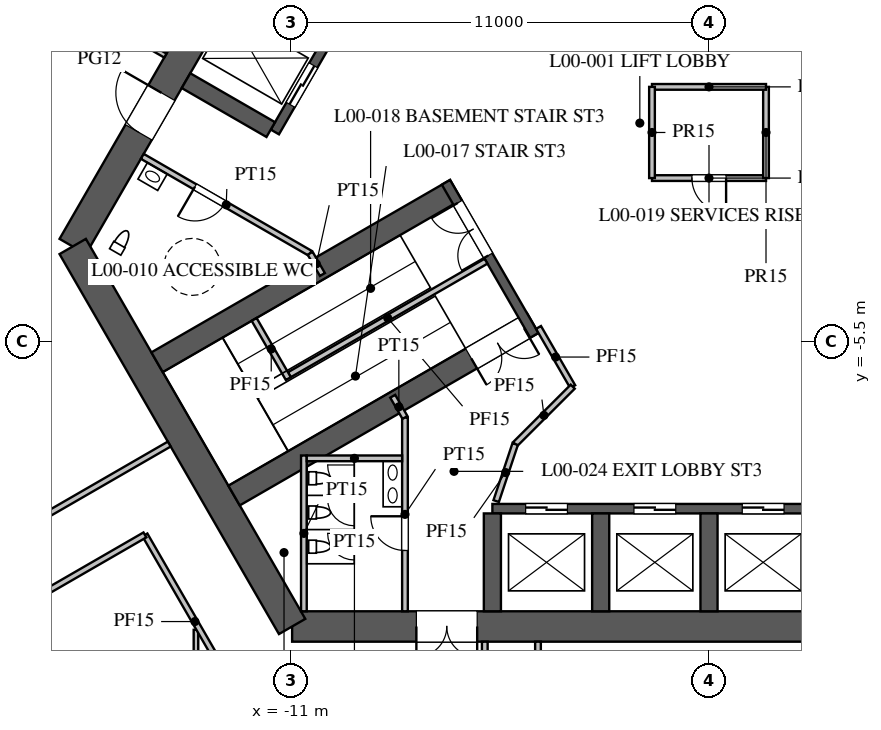
"""IFC4 building model, lengths in metres.
Left out: names, types, materials, properties, quantities, classifications, styles, units other than length and angle.
Written with IfcOpenShell. Run it as: python <this file> out.ifc"""

import sys

from ifc_helpers import new_model, si_unit, direction, frame, frame_2d, origin, place, context, subcontext, project, spatial, polyline, rectangle, outline, extrude, element, fill, save


model = new_model("IFC4")
c1 = context("Model", 3, precision=1e-05, world=origin(), true_north=direction((0.0, 1.0)))
c2 = subcontext(c1, "Body", "Model", "MODEL_VIEW")
j1 = project(units=[si_unit("LENGTHUNIT", "METRE"), si_unit("PLANEANGLEUNIT", "RADIAN")], contexts=[c1])
p1 = place(None, origin())
s1 = spatial("IfcSite", under=j1, at=p1, CompositionType="ELEMENT")
p2 = place(p1, origin())
s2 = spatial("IfcBuilding", under=s1, at=p2, CompositionType="ELEMENT")
p3 = place(p2, origin())
s3 = spatial("IfcBuildingStorey", under=s2, at=p3, CompositionType="ELEMENT", Elevation=0.0)
p4 = place(p3, frame((-10.97, -13.0, 0.0), z_axis=(0.0, 0.0, 1.0), x_axis=(1.0, 0.0, 0.0)))
e1 = element("IfcWall", 1, at=p4, inside=s3, PredefinedType="SHEAR", context=c2, shape_type="SweptSolid", body=[
    extrude(rectangle(XDim=21.939, YDim=0.8, at=frame_2d((10.97, 0.0))), origin(), (0.0, 0.0, 1.0), 6.5),
])
p5 = place(p4, frame((16.97, 0.0, 0.0)))
e2 = element("IfcOpeningElement", 2, at=p5, cuts=e1, PredefinedType="OPENING", context=c2, shape_type="SweptSolid", body=[
    extrude(rectangle(XDim=1.8, YDim=2.1, at=frame_2d((0.9, 1.05))), frame((0.0, 0.41, 0.0), z_axis=(0.0, -1.0, 0.0), x_axis=(1.0, 0.0, 0.0)), (0.0, 0.0, 1.0), 0.82),
])
p6 = place(p4, frame((3.27, 0.0, 0.0)))
e3 = element("IfcOpeningElement", 3, at=p6, cuts=e1, PredefinedType="OPENING", context=c2, shape_type="SweptSolid", body=[
    extrude(rectangle(XDim=1.6, YDim=2.1, at=frame_2d((0.8, 1.05))), frame((0.0, 0.41, 0.0), z_axis=(0.0, -1.0, 0.0), x_axis=(1.0, 0.0, 0.0)), (0.0, 0.0, 1.0), 0.82),
])
p7 = place(p3, frame((-5.773, 16.0, 0.0), z_axis=(0.0, 0.0, 1.0), x_axis=(-0.500002442456, -0.866023993627, 0.0)))
e4 = element("IfcWall", 4, at=p7, inside=s3, PredefinedType="SHEAR", context=c2, shape_type="SweptSolid", body=[
    extrude(rectangle(XDim=21.939, YDim=0.8, at=frame_2d((10.97, 0.0))), origin(), (0.0, 0.0, 1.0), 6.5),
])
p8 = place(p7, frame((17.27, 0.0, 0.0)))
e5 = element("IfcOpeningElement", 5, at=p8, cuts=e4, PredefinedType="OPENING", context=c2, shape_type="SweptSolid", body=[
    extrude(rectangle(XDim=1.2, YDim=2.1, at=frame_2d((0.6, 1.05))), frame((0.0, 0.41, 0.0), z_axis=(0.0, -1.0, 0.0), x_axis=(1.0, 0.0, 0.0)), (0.0, 0.0, 1.0), 0.82),
])
p9 = place(p7, frame((3.27, 0.0, 0.0)))
e6 = element("IfcOpeningElement", 6, at=p9, cuts=e4, PredefinedType="OPENING", context=c2, shape_type="SweptSolid", body=[
    extrude(rectangle(XDim=1.6, YDim=2.1, at=frame_2d((0.8, 1.05))), frame((0.0, 0.41, 0.0), z_axis=(0.0, -1.0, 0.0), x_axis=(1.0, 0.0, 0.0)), (0.0, 0.0, 1.0), 0.82),
])
p10 = place(p3, frame((-16.743, -3.0, 0.0), z_axis=(0.0, 0.0, 1.0), x_axis=(0.499995765644, -0.866027848477, 0.0)))
e7 = element("IfcWall", 7, at=p10, inside=s3, PredefinedType="SHEAR", context=c2, shape_type="SweptSolid", body=[
    extrude(rectangle(XDim=11.547, YDim=0.8, at=frame_2d((5.773, 0.0))), origin(), (0.0, 0.0, 1.0), 6.5),
])
p11 = place(p3, frame((-5.7, -9.9, 0.0), z_axis=(0.0, 0.0, 1.0), x_axis=(1.0, 0.0, 0.0)))
e8 = element("IfcWall", 8, at=p11, inside=s3, PredefinedType="SHEAR", context=c2, shape_type="SweptSolid", body=[
    extrude(rectangle(XDim=11.4, YDim=0.25, at=frame_2d((5.7, 0.0))), origin(), (0.0, 0.0, 1.0), 6.5),
])
p12 = place(p11, frame((0.875, 0.0, 0.0)))
e9 = element("IfcOpeningElement", 9, at=p12, cuts=e8, PredefinedType="OPENING", context=c2, shape_type="SweptSolid", body=[
    extrude(rectangle(XDim=1.1, YDim=2.2, at=frame_2d((0.55, 1.1))), frame((0.0, 0.135, 0.0), z_axis=(0.0, -1.0, 0.0), x_axis=(1.0, 0.0, 0.0)), (0.0, 0.0, 1.0), 0.27),
])
p13 = place(p11, frame((3.725, 0.0, 0.0)))
e10 = element("IfcOpeningElement", 10, at=p13, cuts=e8, PredefinedType="OPENING", context=c2, shape_type="SweptSolid", body=[
    extrude(rectangle(XDim=1.1, YDim=2.2, at=frame_2d((0.55, 1.1))), frame((0.0, 0.135, 0.0), z_axis=(0.0, -1.0, 0.0), x_axis=(1.0, 0.0, 0.0)), (0.0, 0.0, 1.0), 0.27),
])
p14 = place(p11, frame((6.575, 0.0, 0.0)))
e11 = element("IfcOpeningElement", 11, at=p14, cuts=e8, PredefinedType="OPENING", context=c2, shape_type="SweptSolid", body=[
    extrude(rectangle(XDim=1.1, YDim=2.2, at=frame_2d((0.55, 1.1))), frame((0.0, 0.135, 0.0), z_axis=(0.0, -1.0, 0.0), x_axis=(1.0, 0.0, 0.0)), (0.0, 0.0, 1.0), 0.27),
])
p15 = place(p11, frame((9.425, 0.0, 0.0)))
e12 = element("IfcOpeningElement", 12, at=p15, cuts=e8, PredefinedType="OPENING", context=c2, shape_type="SweptSolid", body=[
    extrude(rectangle(XDim=1.1, YDim=2.2, at=frame_2d((0.55, 1.1))), frame((0.0, 0.135, 0.0), z_axis=(0.0, -1.0, 0.0), x_axis=(1.0, 0.0, 0.0)), (0.0, 0.0, 1.0), 0.27),
])
for number, where, z_axis, x_axis in (
    (13, (-5.7, -10.025, 0.0), (0.0, 0.0, 1.0), (0.0, -1.0, 0.0)),
    (14, (-2.85, -10.025, 0.0), (0.0, 0.0, 1.0), (0.0, -1.0, 0.0)),
    (15, (0.0, -10.025, 0.0), (0.0, 0.0, 1.0), (0.0, -1.0, 0.0)),
):
    element("IfcWall", number, at=place(p3, frame(where, z_axis=z_axis, x_axis=x_axis)), inside=s3, PredefinedType="SHEAR", context=c2, shape_type="SweptSolid", body=[
        extrude(rectangle(XDim=2.575, YDim=0.45, at=frame_2d((1.288, 0.0))), origin(), (0.0, 0.0, 1.0), 6.5),
    ])
p16 = place(p3, frame((-5.724, 9.886, 0.0), z_axis=(0.0, 0.0, 1.0), x_axis=(-0.500001763848, -0.866024385424, 0.0)))
e16 = element("IfcWall", 16, at=p16, inside=s3, PredefinedType="SHEAR", context=c2, shape_type="SweptSolid", body=[
    extrude(rectangle(XDim=11.4, YDim=0.25, at=frame_2d((5.7, 0.0))), origin(), (0.0, 0.0, 1.0), 6.5),
])
p17 = place(p16, frame((0.875, 0.0, 0.0)))
e17 = element("IfcOpeningElement", 17, at=p17, cuts=e16, PredefinedType="OPENING", context=c2, shape_type="SweptSolid", body=[
    extrude(rectangle(XDim=1.1, YDim=2.2, at=frame_2d((0.55, 1.1))), frame((0.0, 0.135, 0.0), z_axis=(0.0, -1.0, 0.0), x_axis=(1.0, 0.0, 0.0)), (0.0, 0.0, 1.0), 0.27),
])
p18 = place(p16, frame((3.725, 0.0, 0.0)))
e18 = element("IfcOpeningElement", 18, at=p18, cuts=e16, PredefinedType="OPENING", context=c2, shape_type="SweptSolid", body=[
    extrude(rectangle(XDim=1.1, YDim=2.2, at=frame_2d((0.55, 1.1))), frame((0.0, 0.135, 0.0), z_axis=(0.0, -1.0, 0.0), x_axis=(1.0, 0.0, 0.0)), (0.0, 0.0, 1.0), 0.27),
])
p19 = place(p16, frame((6.525, 0.0, 0.0)))
e19 = element("IfcOpeningElement", 19, at=p19, cuts=e16, PredefinedType="OPENING", context=c2, shape_type="SweptSolid", body=[
    extrude(rectangle(XDim=1.2, YDim=2.2, at=frame_2d((0.6, 1.1))), frame((0.0, 0.135, 0.0), z_axis=(0.0, -1.0, 0.0), x_axis=(1.0, 0.0, 0.0)), (0.0, 0.0, 1.0), 0.27),
])
p20 = place(p16, frame((9.375, 0.0, 0.0)))
e20 = element("IfcOpeningElement", 20, at=p20, cuts=e16, PredefinedType="OPENING", context=c2, shape_type="SweptSolid", body=[
    extrude(rectangle(XDim=1.2, YDim=2.2, at=frame_2d((0.6, 1.1))), frame((0.0, 0.135, 0.0), z_axis=(0.0, -1.0, 0.0), x_axis=(1.0, 0.0, 0.0)), (0.0, 0.0, 1.0), 0.27),
])
p21 = place(p3, frame((-11.532, 0.076, 0.0), z_axis=(0.0, 0.0, 1.0), x_axis=(-0.866005588531, 0.500034319456, 0.0)))
e21 = element("IfcWall", 21, at=p21, inside=s3, PredefinedType="SHEAR", context=c2, shape_type="SweptSolid", body=[
    extrude(rectangle(XDim=2.575, YDim=0.45, at=frame_2d((1.288, 0.0))), origin(), (0.0, 0.0, 1.0), 6.5),
])
p22 = place(p3, frame((-6.663, -1.509, 0.0), z_axis=(0.0, 0.0, 1.0), x_axis=(-0.866019375473, -0.500010441196, 0.0)))
e22 = element("IfcWall", 22, at=p22, inside=s3, PredefinedType="SHEAR", context=c2, shape_type="SweptSolid", body=[
    extrude(rectangle(XDim=9.075, YDim=0.6, at=frame_2d((4.538, 0.0))), origin(), (0.0, 0.0, 1.0), 6.5),
])
p23 = place(p3, frame((-4.638, -5.016, 0.0), z_axis=(0.0, 0.0, 1.0), x_axis=(-0.866019375473, -0.500010441196, 0.0)))
e23 = element("IfcWall", 23, at=p23, inside=s3, PredefinedType="SHEAR", context=c2, shape_type="SweptSolid", body=[
    extrude(rectangle(XDim=9.075, YDim=0.6, at=frame_2d((4.538, 0.0))), origin(), (0.0, 0.0, 1.0), 6.5),
])
p24 = place(p23, frame((0.265, 0.0, 0.0)))
e24 = element("IfcOpeningElement", 24, at=p24, cuts=e23, PredefinedType="OPENING", context=c2, shape_type="SweptSolid", body=[
    extrude(rectangle(XDim=1.6, YDim=2.1, at=frame_2d((0.8, 1.05))), frame((0.0, 0.31, 0.0), z_axis=(0.0, -1.0, 0.0), x_axis=(1.0, 0.0, 0.0)), (0.0, 0.0, 1.0), 0.62),
])
p25 = place(p3, frame((-6.922, -1.312, 0.0), z_axis=(0.0, 0.0, 1.0), x_axis=(0.499984536904, -0.866034331223, 0.0)))
e25 = element("IfcWall", 25, at=p25, inside=s3, PredefinedType="SHEAR", context=c2, shape_type="SweptSolid", body=[
    extrude(rectangle(XDim=4.65, YDim=0.25, at=frame_2d((2.325, 0.0))), origin(), (0.0, 0.0, 1.0), 6.5),
])
p26 = place(p25, frame((0.625, 0.0, 0.0)))
e26 = element("IfcOpeningElement", 26, at=p26, cuts=e25, PredefinedType="OPENING", context=c2, shape_type="SweptSolid", body=[
    extrude(rectangle(XDim=1.6, YDim=2.1, at=frame_2d((0.8, 1.05))), frame((0.0, 0.135, 0.0), z_axis=(0.0, -1.0, 0.0), x_axis=(1.0, 0.0, 0.0)), (0.0, 0.0, 1.0), 0.27),
])
p27 = place(p3, frame((-8.0, -7.5, 0.0), z_axis=(0.0, 0.0, 1.0), x_axis=(0.0, -1.0, 0.0)))
e27 = element("IfcWall", 27, at=p27, inside=s3, PredefinedType="PARTITIONING", context=c2, shape_type="SweptSolid", body=[
    extrude(rectangle(XDim=5.1, YDim=0.15, at=frame_2d((2.55, 0.0))), origin(), (0.0, 0.0, 1.0), 6.3),
])
p28 = place(p27, frame((2.6, 0.0, 0.0)))
e28 = element("IfcOpeningElement", 28, at=p28, cuts=e27, PredefinedType="OPENING", context=c2, shape_type="SweptSolid", body=[
    extrude(rectangle(XDim=0.9, YDim=2.1, at=frame_2d((0.45, 1.05))), frame((0.0, 0.085, 0.0), z_axis=(0.0, -1.0, 0.0), x_axis=(1.0, 0.0, 0.0)), (0.0, 0.0, 1.0), 0.17),
])
p29 = place(p3, frame((-10.495, -3.178, 0.0), z_axis=(0.0, 0.0, 1.0), x_axis=(-0.86602216432, 0.500005610874, 0.0)))
e29 = element("IfcWall", 29, at=p29, inside=s3, PredefinedType="PARTITIONING", context=c2, shape_type="SweptSolid", body=[
    extrude(rectangle(XDim=5.1, YDim=0.15, at=frame_2d((2.55, 0.0))), origin(), (0.0, 0.0, 1.0), 6.3),
])
p30 = place(p29, frame((2.6, 0.0, 0.0)))
e30 = element("IfcOpeningElement", 30, at=p30, cuts=e29, PredefinedType="OPENING", context=c2, shape_type="SweptSolid", body=[
    extrude(rectangle(XDim=0.9, YDim=2.1, at=frame_2d((0.45, 1.05))), frame((0.0, 0.085, 0.0), z_axis=(0.0, -1.0, 0.0), x_axis=(1.0, 0.0, 0.0)), (0.0, 0.0, 1.0), 0.17),
])
for number, where, z_axis, x_axis in (
    (31, (-10.495, -3.178, 0.0), (0.0, 0.0, 1.0), (0.5, -0.866, 0.0)),
    (32, (-8.0, -7.5, 0.0), (0.0, 0.0, 1.0), (-0.5, 0.866, 0.0)),
):
    element("IfcWall", number, at=place(p3, frame(where, z_axis=z_axis, x_axis=x_axis)), inside=s3, PredefinedType="PARTITIONING", context=c2, shape_type="SweptSolid", body=[
        extrude(rectangle(XDim=0.645, YDim=0.15, at=frame_2d((0.323, 0.0))), origin(), (0.0, 0.0, 1.0), 6.3),
    ])
p31 = place(p3, frame((-10.66, -8.5, 0.0), z_axis=(0.0, 0.0, 1.0), x_axis=(0.0, -1.0, 0.0)))
e33 = element("IfcWall", 33, at=p31, inside=s3, PredefinedType="PARTITIONING", context=c2, shape_type="SweptSolid", body=[
    extrude(rectangle(XDim=4.1, YDim=0.15, at=frame_2d((2.05, 0.0))), origin(), (0.0, 0.0, 1.0), 6.3),
])
p32 = place(p3, frame((-8.075, -8.575, 0.0), z_axis=(0.0, 0.0, 1.0), x_axis=(-1.0, 0.0, 0.0)))
e34 = element("IfcWall", 34, at=p32, inside=s3, PredefinedType="PARTITIONING", context=c2, shape_type="SweptSolid", body=[
    extrude(rectangle(XDim=2.51, YDim=0.15, at=frame_2d((1.255, 0.0))), origin(), (0.0, 0.0, 1.0), 6.3),
])
p33 = place(p3, frame((-1.5, -1.2, 0.0), z_axis=(0.0, 0.0, 1.0), x_axis=(1.0, 0.0, 0.0)))
e35 = element("IfcWall", 35, at=p33, inside=s3, PredefinedType="PARTITIONING", context=c2, shape_type="SweptSolid", body=[
    extrude(rectangle(XDim=3.0, YDim=0.15, at=frame_2d((1.5, 0.0))), origin(), (0.0, 0.0, 1.0), 6.3),
])
p34 = place(p33, frame((1.05, 0.0, 0.0)))
e36 = element("IfcOpeningElement", 36, at=p34, cuts=e35, PredefinedType="OPENING", context=c2, shape_type="SweptSolid", body=[
    extrude(rectangle(XDim=0.9, YDim=2.1, at=frame_2d((0.45, 1.05))), frame((0.0, 0.085, 0.0), z_axis=(0.0, -1.0, 0.0), x_axis=(1.0, 0.0, 0.0)), (0.0, 0.0, 1.0), 0.17),
])
p35 = place(p3, frame((1.5, -1.2, 0.0), z_axis=(0.0, 0.0, 1.0), x_axis=(0.0, 1.0, 0.0)))
e37 = element("IfcWall", 37, at=p35, inside=s3, PredefinedType="PARTITIONING", context=c2, shape_type="SweptSolid", body=[
    extrude(rectangle(XDim=2.4, YDim=0.15, at=frame_2d((1.2, 0.0))), origin(), (0.0, 0.0, 1.0), 6.3),
])
p36 = place(p3, frame((1.5, 1.2, 0.0), z_axis=(0.0, 0.0, 1.0), x_axis=(-1.0, 0.0, 0.0)))
e38 = element("IfcWall", 38, at=p36, inside=s3, PredefinedType="PARTITIONING", context=c2, shape_type="SweptSolid", body=[
    extrude(rectangle(XDim=3.0, YDim=0.15, at=frame_2d((1.5, 0.0))), origin(), (0.0, 0.0, 1.0), 6.3),
])
p37 = place(p3, frame((-1.5, 1.2, 0.0), z_axis=(0.0, 0.0, 1.0), x_axis=(0.0, -1.0, 0.0)))
e39 = element("IfcWall", 39, at=p37, inside=s3, PredefinedType="PARTITIONING", context=c2, shape_type="SweptSolid", body=[
    extrude(rectangle(XDim=2.4, YDim=0.15, at=frame_2d((1.2, 0.0))), origin(), (0.0, 0.0, 1.0), 6.3),
])
p38 = place(p3, frame((-14.203, -8.2, 0.0), z_axis=(0.0, 0.0, 1.0), x_axis=(-0.866024965723, -0.500000758745, 0.0)))
e40 = element("IfcWall", 40, at=p38, inside=s3, PredefinedType="PARTITIONING", context=c2, shape_type="SweptSolid", body=[
    extrude(rectangle(XDim=18.25, YDim=0.15, at=frame_2d((9.125, 0.0))), origin(), (0.0, 0.0, 1.0), 4.6),
])
p39 = place(p3, frame((-13.5, -13.087, 0.0), z_axis=(0.0, 0.0, 1.0), x_axis=(0.0, -1.0, 0.0)))
e41 = element("IfcWall", 41, at=p39, inside=s3, PredefinedType="PARTITIONING", context=c2, shape_type="SweptSolid", body=[
    extrude(rectangle(XDim=12.437, YDim=0.12, at=frame_2d((6.218, 0.0))), origin(), (0.0, 0.0, 1.0), 5.0),
])
p40 = place(p39, frame((2.9, 0.0, 0.0)))
e42 = element("IfcOpeningElement", 42, at=p40, cuts=e41, PredefinedType="OPENING", context=c2, shape_type="SweptSolid", body=[
    extrude(rectangle(XDim=0.9, YDim=2.1, at=frame_2d((0.45, 1.05))), frame((0.0, 0.07, 0.0), z_axis=(0.0, -1.0, 0.0), x_axis=(1.0, 0.0, 0.0)), (0.0, 0.0, 1.0), 0.14),
])
p41 = place(p3, frame((-14.305, 2.023, 0.0), z_axis=(0.0, 0.0, 1.0), x_axis=(-0.866026010844, 0.49999894854, 0.0)))
e43 = element("IfcWall", 43, at=p41, inside=s3, PredefinedType="PARTITIONING", context=c2, shape_type="SweptSolid", body=[
    extrude(rectangle(XDim=4.0, YDim=0.12, at=frame_2d((2.0, 0.0))), origin(), (0.0, 0.0, 1.0), 5.0),
])
p42 = place(p3, frame((-4.5, -13.4, 0.0), z_axis=(0.0, 0.0, 1.0), x_axis=(0.0, -1.0, 0.0)))
e44 = element("IfcWall", 44, at=p42, inside=s3, PredefinedType="PARTITIONING", context=c2, shape_type="SweptSolid", body=[
    extrude(rectangle(XDim=5.05, YDim=0.15, at=frame_2d((2.525, 0.0))), origin(), (0.0, 0.0, 1.0), 5.4),
])
p43 = place(p3, frame((-5.867, -3.387, 0.0), z_axis=(0.0, 0.0, 1.0), x_axis=(-0.866014108153, -0.500019564097, 0.0)))
e45 = element("IfcWall", 45, at=p43, inside=s3, PredefinedType="PARTITIONING", context=c2, shape_type="SweptSolid", body=[
    extrude(outline(polyline([(0.0, 0.0), (5.975, 0.0), (5.975, 4.014), (1.966, 6.3), (0.0, 6.3), (0.0, 0.0)])), frame((0.0, 0.075, 0.0), z_axis=(0.0, -1.0, 0.0), x_axis=(1.0, 0.0, 0.0)), (0.0, 0.0, 1.0), 0.15),
])
p44 = place(p3, frame((-11.969, -4.919, 0.0), z_axis=(0.0, 0.0, 1.0), x_axis=(0.499961193289, -0.866047807691, 0.0)))
e46 = element("IfcWall", 46, at=p44, inside=s3, PredefinedType="PARTITIONING", context=c2, shape_type="SweptSolid", body=[
    extrude(rectangle(XDim=1.8, YDim=0.15, at=frame_2d((0.9, 0.0))), origin(), (0.0, 0.0, 1.0), 3.575),
])
p45 = place(p3, frame((-4.486, -5.13, 0.0), z_axis=(0.0, 0.0, 1.0), x_axis=(0.499961193289, -0.866047807691, 0.0)))
e47 = element("IfcWall", 47, at=p45, inside=s3, PredefinedType="PARTITIONING", context=c2, shape_type="SweptSolid", body=[
    extrude(rectangle(XDim=1.8, YDim=0.15, at=frame_2d((0.9, 0.0))), origin(), (0.0, 0.0, 1.0), 6.3),
])
p46 = place(p3, frame((-3.586, -6.689, 0.0), z_axis=(0.0, 0.0, 1.0), x_axis=(-0.707905319983, -0.706307339577, 0.0)))
e48 = element("IfcWall", 48, at=p46, inside=s3, PredefinedType="PARTITIONING", context=c2, shape_type="SweptSolid", body=[
    extrude(rectangle(XDim=2.139, YDim=0.15, at=frame_2d((1.069, 0.0))), origin(), (0.0, 0.0, 1.0), 6.3),
])
p47 = place(p3, frame((-5.1, -8.2, 0.0), z_axis=(0.0, 0.0, 1.0), x_axis=(-0.316227766017, -0.948683298051, 0.0)))
e49 = element("IfcWall", 49, at=p47, inside=s3, PredefinedType="PARTITIONING", context=c2, shape_type="SweptSolid", body=[
    extrude(rectangle(XDim=1.581, YDim=0.15, at=frame_2d((0.791, 0.0))), origin(), (0.0, 0.0, 1.0), 6.3),
])
p48 = place(p3, frame((-5.9, -13.4, 0.0), z_axis=(0.0, 0.0, 1.0), x_axis=(0.0, -1.0, 0.0)))
e50 = element("IfcWall", 50, at=p48, inside=s3, PredefinedType="PARTITIONING", context=c2, shape_type="SweptSolid", body=[
    extrude(rectangle(XDim=1.75, YDim=0.15, at=frame_2d((0.875, 0.0))), origin(), (0.0, 0.0, 1.0), 6.3),
])
p49 = place(p3, frame((-12.211, -15.15, 0.0), z_axis=(0.0, 0.0, 1.0), x_axis=(-0.499999433879, 0.866025730634, 0.0)))
e51 = element("IfcWall", 51, at=p49, inside=s3, PredefinedType="PARTITIONING", context=c2, shape_type="SweptSolid", body=[
    extrude(rectangle(XDim=5.265, YDim=0.15, at=frame_2d((2.632, 0.0))), origin(), (0.0, 0.0, 1.0), 6.3),
])
p50 = place(p3, frame((-14.843, -10.591, 0.0), z_axis=(0.0, 0.0, 1.0), x_axis=(-0.86602961784, -0.499992700971, 0.0)))
e52 = element("IfcWall", 52, at=p50, inside=s3, PredefinedType="PARTITIONING", context=c2, shape_type="SweptSolid", body=[
    extrude(rectangle(XDim=14.05, YDim=0.15, at=frame_2d((7.025, 0.0))), origin(), (0.0, 0.0, 1.0), 6.3),
])
p51 = place(p28, frame((0.9, 0.0, 0.0), z_axis=(0.0, 0.0, 1.0), x_axis=(-1.0, 0.0, 0.0)))
e53 = element("IfcDoor", 53, at=p51, inside=s3, OperationType="SINGLE_SWING_RIGHT", PredefinedType="DOOR", context=c2, shape_type="SweptSolid", body=[
    extrude(rectangle(XDim=0.9, YDim=2.1, at=frame_2d((0.45, 1.05))), frame((0.0, 0.025, 0.0), z_axis=(0.0, -1.0, 0.0), x_axis=(1.0, 0.0, 0.0)), (0.0, 0.0, 1.0), 0.05),
])
fill(e28, e53)
p52 = place(p30, origin())
e54 = element("IfcDoor", 54, at=p52, inside=s3, OperationType="SINGLE_SWING_RIGHT", PredefinedType="DOOR", context=c2, shape_type="SweptSolid", body=[
    extrude(rectangle(XDim=0.9, YDim=2.1, at=frame_2d((0.45, 1.05))), frame((0.0, 0.025, 0.0), z_axis=(0.0, -1.0, 0.0), x_axis=(1.0, 0.0, 0.0)), (0.0, 0.0, 1.0), 0.05),
])
fill(e30, e54)
p53 = place(p34, frame((0.9, 0.0, 0.0), z_axis=(0.0, 0.0, 1.0), x_axis=(-1.0, 0.0, 0.0)))
e55 = element("IfcDoor", 55, at=p53, inside=s3, OperationType="SINGLE_SWING_LEFT", PredefinedType="DOOR", context=c2, shape_type="SweptSolid", body=[
    extrude(rectangle(XDim=0.9, YDim=2.1, at=frame_2d((0.45, 1.05))), frame((0.0, 0.025, 0.0), z_axis=(0.0, -1.0, 0.0), x_axis=(1.0, 0.0, 0.0)), (0.0, 0.0, 1.0), 0.05),
])
fill(e36, e55)
p54 = place(p6, frame((1.6, 0.0, 0.0), z_axis=(0.0, 0.0, 1.0), x_axis=(-1.0, 0.0, 0.0)))
e56 = element("IfcDoor", 56, at=p54, inside=s3, OperationType="DOUBLE_DOOR_SINGLE_SWING", PredefinedType="DOOR", context=c2, shape_type="SweptSolid", body=[
    extrude(rectangle(XDim=1.6, YDim=2.1, at=frame_2d((0.8, 1.05))), frame((0.0, 0.025, 0.0), z_axis=(0.0, -1.0, 0.0), x_axis=(1.0, 0.0, 0.0)), (0.0, 0.0, 1.0), 0.05),
])
fill(e3, e56)
p55 = place(p8, frame((1.2, 0.0, 0.0), z_axis=(0.0, 0.0, 1.0), x_axis=(-1.0, 0.0, 0.0)))
e57 = element("IfcDoor", 57, at=p55, inside=s3, OperationType="SINGLE_SWING_RIGHT", PredefinedType="DOOR", context=c2, shape_type="SweptSolid", body=[
    extrude(rectangle(XDim=1.2, YDim=2.1, at=frame_2d((0.6, 1.05))), frame((0.0, 0.025, 0.0), z_axis=(0.0, -1.0, 0.0), x_axis=(1.0, 0.0, 0.0)), (0.0, 0.0, 1.0), 0.05),
])
fill(e5, e57)
p56 = place(p26, frame((1.6, 0.0, 0.0), z_axis=(0.0, 0.0, 1.0), x_axis=(-1.0, 0.0, 0.0)))
e58 = element("IfcDoor", 58, at=p56, inside=s3, OperationType="DOUBLE_DOOR_SINGLE_SWING", PredefinedType="DOOR", context=c2, shape_type="SweptSolid", body=[
    extrude(rectangle(XDim=1.6, YDim=2.1, at=frame_2d((0.8, 1.05))), frame((0.0, 0.025, 0.0), z_axis=(0.0, -1.0, 0.0), x_axis=(1.0, 0.0, 0.0)), (0.0, 0.0, 1.0), 0.05),
])
fill(e26, e58)
p57 = place(p24, origin())
e59 = element("IfcDoor", 59, at=p57, inside=s3, OperationType="DOUBLE_DOOR_SINGLE_SWING", PredefinedType="DOOR", context=c2, shape_type="SweptSolid", body=[
    extrude(rectangle(XDim=1.6, YDim=2.1, at=frame_2d((0.8, 1.05))), frame((0.0, 0.025, 0.0), z_axis=(0.0, -1.0, 0.0), x_axis=(1.0, 0.0, 0.0)), (0.0, 0.0, 1.0), 0.05),
])
fill(e24, e59)
p58 = place(p12, origin())
e60 = element("IfcDoor", 60, at=p58, inside=s3, OperationType="DOUBLE_DOOR_SLIDING", PredefinedType="DOOR", context=c2, shape_type="SweptSolid", body=[
    extrude(rectangle(XDim=1.1, YDim=2.2, at=frame_2d((0.55, 1.1))), frame((0.0, 0.025, 0.0), z_axis=(0.0, -1.0, 0.0), x_axis=(1.0, 0.0, 0.0)), (0.0, 0.0, 1.0), 0.05),
])
fill(e9, e60)
p59 = place(p13, origin())
e61 = element("IfcDoor", 61, at=p59, inside=s3, OperationType="DOUBLE_DOOR_SLIDING", PredefinedType="DOOR", context=c2, shape_type="SweptSolid", body=[
    extrude(rectangle(XDim=1.1, YDim=2.2, at=frame_2d((0.55, 1.1))), frame((0.0, 0.025, 0.0), z_axis=(0.0, -1.0, 0.0), x_axis=(1.0, 0.0, 0.0)), (0.0, 0.0, 1.0), 0.05),
])
fill(e10, e61)
p60 = place(p14, origin())
e62 = element("IfcDoor", 62, at=p60, inside=s3, OperationType="DOUBLE_DOOR_SLIDING", PredefinedType="DOOR", context=c2, shape_type="SweptSolid", body=[
    extrude(rectangle(XDim=1.1, YDim=2.2, at=frame_2d((0.55, 1.1))), frame((0.0, 0.025, 0.0), z_axis=(0.0, -1.0, 0.0), x_axis=(1.0, 0.0, 0.0)), (0.0, 0.0, 1.0), 0.05),
])
fill(e11, e62)
p61 = place(p20, origin())
e63 = element("IfcDoor", 63, at=p61, inside=s3, OperationType="DOUBLE_DOOR_SLIDING", PredefinedType="DOOR", context=c2, shape_type="SweptSolid", body=[
    extrude(rectangle(XDim=1.2, YDim=2.2, at=frame_2d((0.6, 1.1))), frame((0.0, 0.025, 0.0), z_axis=(0.0, -1.0, 0.0), x_axis=(1.0, 0.0, 0.0)), (0.0, 0.0, 1.0), 0.05),
])
fill(e20, e63)
save(model, sys.argv[1])
